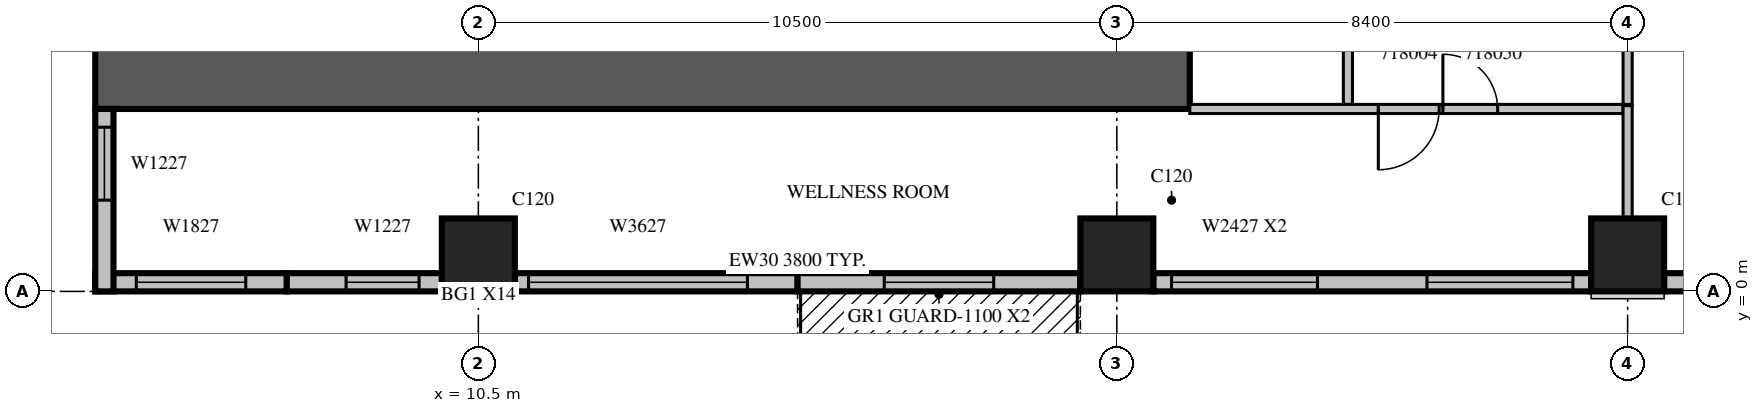
"""IFC4 building model, lengths in metres.
Left out: names, types, materials, properties, quantities, classifications, styles, units other than length and angle.
Written with IfcOpenShell. Run it as: python <this file> out.ifc"""

import sys

from ifc_helpers import new_model, si_unit, direction, frame, frame_2d, origin, origin_2d, place, context, subcontext, project, spatial, rectangle, extrude, source, transform, mapped, element, fill, save


model = new_model("IFC4")
c1 = context("Model", 3, precision=1e-05, world=origin(), true_north=direction((0.0, 1.0)))
c2 = subcontext(c1, "Body", "Model", "MODEL_VIEW")
j1 = project(units=[si_unit("LENGTHUNIT", "METRE"), si_unit("PLANEANGLEUNIT", "RADIAN")], contexts=[c1])
p1 = place(None, origin())
s1 = spatial("IfcSite", under=j1, at=p1, CompositionType="ELEMENT")
p2 = place(p1, origin())
s2 = spatial("IfcBuilding", under=s1, at=p2, CompositionType="ELEMENT")
p3 = place(p2, frame((0.0, 0.0, 86.7)))
s3 = spatial("IfcBuildingStorey", under=s2, at=p3, CompositionType="ELEMENT", Elevation=86.7)
m1 = source(origin(), c2, "Body", "SweptSolid", [
    extrude(rectangle(XDim=1.2, YDim=1.2, at=origin_2d()), origin(), (0.0, 0.0, 1.0), 4.2),
])
for number, where, z_axis, x_axis in (
    (1, (10.5, 0.6, 0.0), (0.0, 0.0, 1.0), (1.0, 0.0, 0.0)),
    (2, (21.0, 0.6, 0.0), (0.0, 0.0, 1.0), (1.0, 0.0, 0.0)),
    (3, (29.4, 0.6, 0.0), (0.0, 0.0, 1.0), (1.0, 0.0, 0.0)),
):
    element("IfcColumn", number, at=place(p3, frame(where, z_axis=z_axis, x_axis=x_axis)), inside=s3, PredefinedType="COLUMN", context=c2, shape_type="MappedRepresentation", body=[
        mapped(m1, transform((0.0, 0.0, 0.0), scale=1.0)),
    ])
m2 = source(origin(), c2, "Body", "SweptSolid", [
    extrude(rectangle(XDim=18.0, YDim=1.2, at=frame_2d((9.0, 0.0))), origin(), (0.0, 0.0, 1.0), 4.2),
])
p4 = place(p3, frame((4.2, 3.6, 0.0), z_axis=(0.0, 0.0, 1.0), x_axis=(1.0, 0.0, 0.0)))
e4 = element("IfcWall", 4, at=p4, inside=s3, PredefinedType="SHEAR", context=c2, shape_type="MappedRepresentation", body=[
    mapped(m2, transform((0.0, 0.0, 0.0), scale=1.0)),
])
m3 = source(origin(), c2, "Body", "SweptSolid", [
    extrude(rectangle(XDim=3.15, YDim=0.3, at=frame_2d((1.575, 0.0))), origin(), (0.0, 0.0, 1.0), 3.8),
])
p5 = place(p3, frame((4.2, 0.15, 0.0), z_axis=(0.0, 0.0, 1.0), x_axis=(1.0, 0.0, 0.0)))
e5 = element("IfcWall", 5, at=p5, inside=s3, PredefinedType="STANDARD", context=c2, shape_type="MappedRepresentation", body=[
    mapped(m3, transform((0.0, 0.0, 0.0), scale=1.0)),
])
m4 = source(origin(), c2, "Body", "SweptSolid", [
    extrude(rectangle(XDim=1.8, YDim=2.7, at=frame_2d((0.9, 1.35))), frame((0.0, 0.16, 0.0), z_axis=(0.0, -1.0, 0.0), x_axis=(1.0, 0.0, 0.0)), (0.0, 0.0, 1.0), 0.32),
])
p6 = place(p5, frame((0.675, 0.0, 0.6)))
e6 = element("IfcOpeningElement", 6, at=p6, cuts=e5, PredefinedType="OPENING", context=c2, shape_type="MappedRepresentation", body=[
    mapped(m4, transform((0.0, 0.0, 0.0), scale=1.0)),
])
m5 = source(origin(), c2, "Body", "SweptSolid", [
    extrude(rectangle(XDim=2.55, YDim=0.3, at=frame_2d((1.275, 0.0))), origin(), (0.0, 0.0, 1.0), 3.8),
])
p7 = place(p3, frame((7.35, 0.15, 0.0), z_axis=(0.0, 0.0, 1.0), x_axis=(1.0, 0.0, 0.0)))
e7 = element("IfcWall", 7, at=p7, inside=s3, PredefinedType="STANDARD", context=c2, shape_type="MappedRepresentation", body=[
    mapped(m5, transform((0.0, 0.0, 0.0), scale=1.0)),
])
m6 = source(origin(), c2, "Body", "SweptSolid", [
    extrude(rectangle(XDim=1.2, YDim=2.7, at=frame_2d((0.6, 1.35))), frame((0.0, 0.16, 0.0), z_axis=(0.0, -1.0, 0.0), x_axis=(1.0, 0.0, 0.0)), (0.0, 0.0, 1.0), 0.32),
])
p8 = place(p7, frame((0.975, 0.0, 0.6)))
e8 = element("IfcOpeningElement", 8, at=p8, cuts=e7, PredefinedType="OPENING", context=c2, shape_type="MappedRepresentation", body=[
    mapped(m6, transform((0.0, 0.0, 0.0), scale=1.0)),
])
m7 = source(origin(), c2, "Body", "SweptSolid", [
    extrude(rectangle(XDim=4.65, YDim=0.3, at=frame_2d((2.325, 0.0))), origin(), (0.0, 0.0, 1.0), 3.8),
])
p9 = place(p3, frame((11.1, 0.15, 0.0), z_axis=(0.0, 0.0, 1.0), x_axis=(1.0, 0.0, 0.0)))
e9 = element("IfcWall", 9, at=p9, inside=s3, PredefinedType="STANDARD", context=c2, shape_type="MappedRepresentation", body=[
    mapped(m7, transform((0.0, 0.0, 0.0), scale=1.0)),
])
m8 = source(origin(), c2, "Body", "SweptSolid", [
    extrude(rectangle(XDim=3.6, YDim=2.7, at=frame_2d((1.8, 1.35))), frame((0.0, 0.16, 0.0), z_axis=(0.0, -1.0, 0.0), x_axis=(1.0, 0.0, 0.0)), (0.0, 0.0, 1.0), 0.32),
])
p10 = place(p9, frame((0.225, 0.0, 0.6)))
e10 = element("IfcOpeningElement", 10, at=p10, cuts=e9, PredefinedType="OPENING", context=c2, shape_type="MappedRepresentation", body=[
    mapped(m8, transform((0.0, 0.0, 0.0), scale=1.0)),
])
p11 = place(p3, frame((15.75, 0.15, 0.0), z_axis=(0.0, 0.0, 1.0), x_axis=(1.0, 0.0, 0.0)))
e11 = element("IfcWall", 11, at=p11, inside=s3, PredefinedType="STANDARD", context=c2, shape_type="MappedRepresentation", body=[
    mapped(m7, transform((0.0, 0.0, 0.0), scale=1.0)),
])
m9 = source(origin(), c2, "Body", "SweptSolid", [
    extrude(rectangle(XDim=1.8, YDim=2.4, at=frame_2d((0.9, 1.2))), frame((0.0, 0.16, 0.0), z_axis=(0.0, -1.0, 0.0), x_axis=(1.0, 0.0, 0.0)), (0.0, 0.0, 1.0), 0.32),
])
p12 = place(p11, frame((1.425, 0.0, 0.0)))
e12 = element("IfcOpeningElement", 12, at=p12, cuts=e11, PredefinedType="OPENING", context=c2, shape_type="MappedRepresentation", body=[
    mapped(m9, transform((0.0, 0.0, 0.0), scale=1.0)),
])
m10 = source(origin(), c2, "Body", "SweptSolid", [
    extrude(rectangle(XDim=7.2, YDim=0.3, at=frame_2d((3.6, 0.0))), origin(), (0.0, 0.0, 1.0), 3.8),
])
p13 = place(p3, frame((21.6, 0.15, 0.0), z_axis=(0.0, 0.0, 1.0), x_axis=(1.0, 0.0, 0.0)))
e13 = element("IfcWall", 13, at=p13, inside=s3, PredefinedType="STANDARD", context=c2, shape_type="MappedRepresentation", body=[
    mapped(m10, transform((0.0, 0.0, 0.0), scale=1.0)),
])
m11 = source(origin(), c2, "Body", "SweptSolid", [
    extrude(rectangle(XDim=2.4, YDim=2.7, at=frame_2d((1.2, 1.35))), frame((0.0, 0.16, 0.0), z_axis=(0.0, -1.0, 0.0), x_axis=(1.0, 0.0, 0.0)), (0.0, 0.0, 1.0), 0.32),
])
p14 = place(p13, frame((0.3, 0.0, 0.6)))
e14 = element("IfcOpeningElement", 14, at=p14, cuts=e13, PredefinedType="OPENING", context=c2, shape_type="MappedRepresentation", body=[
    mapped(m11, transform((0.0, 0.0, 0.0), scale=1.0)),
])
p15 = place(p13, frame((4.5, 0.0, 0.6)))
e15 = element("IfcOpeningElement", 15, at=p15, cuts=e13, PredefinedType="OPENING", context=c2, shape_type="MappedRepresentation", body=[
    mapped(m11, transform((0.0, 0.0, 0.0), scale=1.0)),
])
p16 = place(p3, frame((30.0, 0.15, 0.0), z_axis=(0.0, 0.0, 1.0), x_axis=(1.0, 0.0, 0.0)))
e16 = element("IfcWall", 16, at=p16, inside=s3, PredefinedType="STANDARD", context=c2, shape_type="MappedRepresentation", body=[
    mapped(m10, transform((0.0, 0.0, 0.0), scale=1.0)),
])
p17 = place(p16, frame((2.5, 0.0, 0.6)))
e17 = element("IfcOpeningElement", 17, at=p17, cuts=e16, PredefinedType="OPENING", context=c2, shape_type="MappedRepresentation", body=[
    mapped(m11, transform((0.0, 0.0, 0.0), scale=1.0)),
])
m12 = source(origin(), c2, "Body", "SweptSolid", [
    extrude(rectangle(XDim=3.0, YDim=0.3, at=frame_2d((1.5, 0.0))), origin(), (0.0, 0.0, 1.0), 3.8),
])
p18 = place(p3, frame((4.35, 3.0, 0.0), z_axis=(0.0, 0.0, 1.0), x_axis=(0.0, -1.0, 0.0)))
e18 = element("IfcWall", 18, at=p18, inside=s3, PredefinedType="STANDARD", context=c2, shape_type="MappedRepresentation", body=[
    mapped(m12, transform((0.0, 0.0, 0.0), scale=1.0)),
])
p19 = place(p18, frame((0.3, 0.0, 0.6)))
e19 = element("IfcOpeningElement", 19, at=p19, cuts=e18, PredefinedType="OPENING", context=c2, shape_type="MappedRepresentation", body=[
    mapped(m6, transform((0.0, 0.0, 0.0), scale=1.0)),
])
m13 = source(origin(), c2, "Body", "SweptSolid", [
    extrude(rectangle(XDim=11.625, YDim=0.15, at=frame_2d((5.812, 0.0))), origin(), (0.0, 0.0, 1.0), 3.8),
])
p20 = place(p3, frame((24.8, 14.7, 0.0), z_axis=(0.0, 0.0, 1.0), x_axis=(0.0, -1.0, 0.0)))
e20 = element("IfcWall", 20, at=p20, inside=s3, PredefinedType="PARTITIONING", context=c2, shape_type="MappedRepresentation", body=[
    mapped(m13, transform((0.0, 0.0, 0.0), scale=1.0)),
])
m14 = source(origin(), c2, "Body", "SweptSolid", [
    extrude(rectangle(XDim=0.9, YDim=2.1, at=frame_2d((0.45, 1.05))), frame((0.0, 0.085, 0.0), z_axis=(0.0, -1.0, 0.0), x_axis=(1.0, 0.0, 0.0)), (0.0, 0.0, 1.0), 0.17),
])
p21 = place(p20, frame((9.262, 0.0, 0.0)))
e21 = element("IfcOpeningElement", 21, at=p21, cuts=e20, PredefinedType="OPENING", context=c2, shape_type="MappedRepresentation", body=[
    mapped(m14, transform((0.0, 0.0, 0.0), scale=1.0)),
])
p22 = place(p20, frame((2.575, 0.0, 0.0)))
e22 = element("IfcOpeningElement", 22, at=p22, cuts=e20, PredefinedType="OPENING", context=c2, shape_type="MappedRepresentation", body=[
    mapped(m14, transform((0.0, 0.0, 0.0), scale=1.0)),
])
m15 = source(origin(), c2, "Body", "SweptSolid", [
    extrude(rectangle(XDim=6.826, YDim=0.15, at=frame_2d((3.413, 0.0))), origin(), (0.0, 0.0, 1.0), 3.8),
])
p23 = place(p3, frame((29.4, 3.075, 0.0), z_axis=(0.0, 0.0, 1.0), x_axis=(0.0, 1.0, 0.0)))
e23 = element("IfcWall", 23, at=p23, inside=s3, PredefinedType="PARTITIONING", context=c2, shape_type="MappedRepresentation", body=[
    mapped(m15, transform((0.0, 0.0, 0.0), scale=1.0)),
])
m16 = source(origin(), c2, "Body", "SweptSolid", [
    extrude(rectangle(XDim=7.125, YDim=0.15, at=frame_2d((3.562, 0.0))), origin(), (0.0, 0.0, 1.0), 3.8),
])
p24 = place(p3, frame((22.2, 3.0, 0.0), z_axis=(0.0, 0.0, 1.0), x_axis=(1.0, 0.0, 0.0)))
e24 = element("IfcWall", 24, at=p24, inside=s3, PredefinedType="PARTITIONING", context=c2, shape_type="MappedRepresentation", body=[
    mapped(m16, transform((0.0, 0.0, 0.0), scale=1.0)),
])
m17 = source(origin(), c2, "Body", "SweptSolid", [
    extrude(rectangle(XDim=1.0, YDim=2.1, at=frame_2d((0.5, 1.05))), frame((0.0, 0.085, 0.0), z_axis=(0.0, -1.0, 0.0), x_axis=(1.0, 0.0, 0.0)), (0.0, 0.0, 1.0), 0.17),
])
p25 = place(p24, frame((3.1, 0.0, 0.0)))
e25 = element("IfcOpeningElement", 25, at=p25, cuts=e24, PredefinedType="OPENING", context=c2, shape_type="MappedRepresentation", body=[
    mapped(m17, transform((0.0, 0.0, 0.0), scale=1.0)),
])
p26 = place(p24, frame((4.162, 0.0, 0.0)))
e26 = element("IfcOpeningElement", 26, at=p26, cuts=e24, PredefinedType="OPENING", context=c2, shape_type="MappedRepresentation", body=[
    mapped(m14, transform((0.0, 0.0, 0.0), scale=1.0)),
])
m18 = source(origin(), c2, "Body", "SweptSolid", [
    extrude(rectangle(XDim=1.856, YDim=0.15, at=frame_2d((0.928, 0.0))), origin(), (0.0, 0.0, 1.0), 3.8),
])
p27 = place(p3, frame((29.4, 1.199, 0.0), z_axis=(0.0, 0.0, 1.0), x_axis=(0.0, 1.0, 0.0)))
e27 = element("IfcWall", 27, at=p27, inside=s3, PredefinedType="PARTITIONING", context=c2, shape_type="MappedRepresentation", body=[
    mapped(m18, transform((0.0, 0.0, 0.0), scale=1.0)),
])
m19 = source(origin(), c2, "Body", "SweptSolid", [
    extrude(rectangle(XDim=1.8, YDim=2.7, at=frame_2d((0.9, 1.35))), frame((0.0, 0.03, 0.0), z_axis=(0.0, -1.0, 0.0), x_axis=(1.0, 0.0, 0.0)), (0.0, 0.0, 1.0), 0.06),
])
p28 = place(p6, origin())
e28 = element("IfcWindow", 28, at=p28, inside=s3, PartitioningType="SINGLE_PANEL", PredefinedType="WINDOW", context=c2, shape_type="MappedRepresentation", body=[
    mapped(m19, transform((0.0, 0.0, 0.0), scale=1.0)),
])
fill(e6, e28)
m20 = source(origin(), c2, "Body", "SweptSolid", [
    extrude(rectangle(XDim=1.2, YDim=2.7, at=frame_2d((0.6, 1.35))), frame((0.0, 0.03, 0.0), z_axis=(0.0, -1.0, 0.0), x_axis=(1.0, 0.0, 0.0)), (0.0, 0.0, 1.0), 0.06),
])
p29 = place(p8, origin())
e29 = element("IfcWindow", 29, at=p29, inside=s3, PartitioningType="SINGLE_PANEL", PredefinedType="WINDOW", context=c2, shape_type="MappedRepresentation", body=[
    mapped(m20, transform((0.0, 0.0, 0.0), scale=1.0)),
])
fill(e8, e29)
m21 = source(origin(), c2, "Body", "SweptSolid", [
    extrude(rectangle(XDim=3.6, YDim=2.7, at=frame_2d((1.8, 1.35))), frame((0.0, 0.03, 0.0), z_axis=(0.0, -1.0, 0.0), x_axis=(1.0, 0.0, 0.0)), (0.0, 0.0, 1.0), 0.06),
])
p30 = place(p10, origin())
e30 = element("IfcWindow", 30, at=p30, inside=s3, PartitioningType="SINGLE_PANEL", PredefinedType="WINDOW", context=c2, shape_type="MappedRepresentation", body=[
    mapped(m21, transform((0.0, 0.0, 0.0), scale=1.0)),
])
fill(e10, e30)
m22 = source(origin(), c2, "Body", "SweptSolid", [
    extrude(rectangle(XDim=1.8, YDim=2.4, at=frame_2d((0.9, 1.2))), frame((0.0, 0.025, 0.0), z_axis=(0.0, -1.0, 0.0), x_axis=(1.0, 0.0, 0.0)), (0.0, 0.0, 1.0), 0.05),
])
p31 = place(p12, origin())
e31 = element("IfcDoor", 31, at=p31, inside=s3, OperationType="SLIDING_TO_LEFT", PredefinedType="DOOR", context=c2, shape_type="MappedRepresentation", body=[
    mapped(m22, transform((0.0, 0.0, 0.0), scale=1.0)),
])
fill(e12, e31)
m23 = source(origin(), c2, "Body", "SweptSolid", [
    extrude(rectangle(XDim=2.4, YDim=2.7, at=frame_2d((1.2, 1.35))), frame((0.0, 0.03, 0.0), z_axis=(0.0, -1.0, 0.0), x_axis=(1.0, 0.0, 0.0)), (0.0, 0.0, 1.0), 0.06),
])
p32 = place(p14, origin())
e32 = element("IfcWindow", 32, at=p32, inside=s3, PartitioningType="SINGLE_PANEL", PredefinedType="WINDOW", context=c2, shape_type="MappedRepresentation", body=[
    mapped(m23, transform((0.0, 0.0, 0.0), scale=1.0)),
])
fill(e14, e32)
p33 = place(p15, origin())
e33 = element("IfcWindow", 33, at=p33, inside=s3, PartitioningType="SINGLE_PANEL", PredefinedType="WINDOW", context=c2, shape_type="MappedRepresentation", body=[
    mapped(m23, transform((0.0, 0.0, 0.0), scale=1.0)),
])
fill(e15, e33)
p34 = place(p19, origin())
e34 = element("IfcWindow", 34, at=p34, inside=s3, PartitioningType="SINGLE_PANEL", PredefinedType="WINDOW", context=c2, shape_type="MappedRepresentation", body=[
    mapped(m20, transform((0.0, 0.0, 0.0), scale=1.0)),
])
fill(e19, e34)
m24 = source(origin(), c2, "Body", "SweptSolid", [
    extrude(rectangle(XDim=1.0, YDim=2.1, at=frame_2d((0.5, 1.05))), frame((0.0, 0.025, 0.0), z_axis=(0.0, -1.0, 0.0), x_axis=(1.0, 0.0, 0.0)), (0.0, 0.0, 1.0), 0.05),
])
p35 = place(p25, origin())
e35 = element("IfcDoor", 35, at=p35, inside=s3, OperationType="SINGLE_SWING_RIGHT", PredefinedType="DOOR", context=c2, shape_type="MappedRepresentation", body=[
    mapped(m24, transform((0.0, 0.0, 0.0), scale=1.0)),
])
fill(e25, e35)
m25 = source(origin(), c2, "Body", "SweptSolid", [
    extrude(rectangle(XDim=0.9, YDim=2.1, at=frame_2d((0.45, 1.05))), frame((0.0, 0.025, 0.0), z_axis=(0.0, -1.0, 0.0), x_axis=(1.0, 0.0, 0.0)), (0.0, 0.0, 1.0), 0.05),
])
p36 = place(p26, origin())
e36 = element("IfcDoor", 36, at=p36, inside=s3, OperationType="SINGLE_SWING_LEFT", PredefinedType="DOOR", context=c2, shape_type="MappedRepresentation", body=[
    mapped(m25, transform((0.0, 0.0, 0.0), scale=1.0)),
])
fill(e26, e36)
save(model, sys.argv[1])
